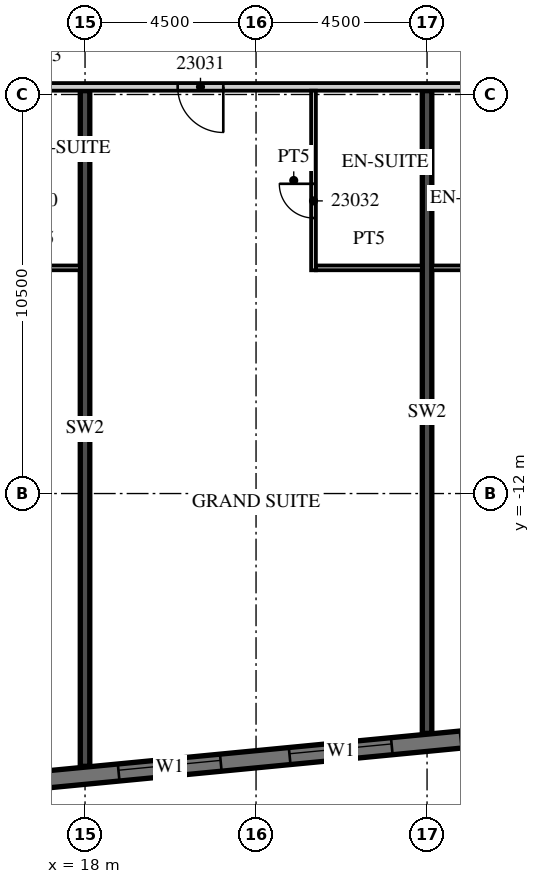
"""IFC4 building model, lengths in metres.
Left out: names, types, materials, properties, quantities, classifications, styles, units other than length and angle.
Written with IfcOpenShell. Run it as: python <this file> out.ifc"""

import sys

from ifc_helpers import new_model, si_unit, direction, frame, frame_2d, origin, place, context, subcontext, project, spatial, rectangle, extrude, element, fill, save


model = new_model("IFC4")
c1 = context("Model", 3, precision=1e-05, world=origin(), true_north=direction((0.0, 1.0)))
c2 = subcontext(c1, "Body", "Model", "MODEL_VIEW")
j1 = project(units=[si_unit("LENGTHUNIT", "METRE"), si_unit("PLANEANGLEUNIT", "RADIAN")], contexts=[c1])
p1 = place(None, origin())
s1 = spatial("IfcSite", under=j1, at=p1, CompositionType="ELEMENT")
p2 = place(p1, origin())
s2 = spatial("IfcBuilding", under=s1, at=p2, CompositionType="ELEMENT")
p3 = place(p2, frame((0.0, 0.0, 110.8)))
s3 = spatial("IfcBuildingStorey", under=s2, at=p3, CompositionType="ELEMENT", Elevation=110.8)
p4 = place(p3, frame((18.0, -19.177, 0.0), z_axis=(0.0, 0.0, 1.0), x_axis=(0.0, 1.0, 0.0)))
e1 = element("IfcWall", 1, at=p4, inside=s3, PredefinedType="SHEAR", context=c2, shape_type="SweptSolid", body=[
    extrude(rectangle(XDim=17.777, YDim=0.25, at=frame_2d((8.889, 0.0))), origin(), (0.0, 0.0, 1.0), 3.3),
])
p5 = place(p3, frame((27.0, -18.311, 0.0), z_axis=(0.0, 0.0, 1.0), x_axis=(0.0, 1.0, 0.0)))
e2 = element("IfcWall", 2, at=p5, inside=s3, PredefinedType="SHEAR", context=c2, shape_type="SweptSolid", body=[
    extrude(rectangle(XDim=16.911, YDim=0.25, at=frame_2d((8.455, 0.0))), origin(), (0.0, 0.0, 1.0), 3.3),
])
p6 = place(p3, frame((-13.521, -22.46, 0.0), z_axis=(0.0, 0.0, 1.0), x_axis=(0.995396096335, 0.095846812164, 0.0)))
e3 = element("IfcWall", 3, at=p6, inside=s3, PredefinedType="SOLIDWALL", context=c2, shape_type="SweptSolid", body=[
    extrude(rectangle(XDim=59.151, YDim=0.45, at=frame_2d((29.575, 0.0))), origin(), (0.0, 0.0, 1.0), 3.02),
])
p7 = place(p6, frame((0.91, 0.0, 0.45)))
e4 = element("IfcOpeningElement", 4, at=p7, cuts=e3, PredefinedType="OPENING", context=c2, shape_type="SweptSolid", body=[
    extrude(rectangle(XDim=2.7, YDim=2.25, at=frame_2d((1.35, 1.125))), frame((0.0, 0.235, 0.0), z_axis=(0.0, -1.0, 0.0), x_axis=(1.0, 0.0, 0.0)), (0.0, 0.0, 1.0), 0.47),
])
p8 = place(p6, frame((5.431, 0.0, 0.45)))
e5 = element("IfcOpeningElement", 5, at=p8, cuts=e3, PredefinedType="OPENING", context=c2, shape_type="SweptSolid", body=[
    extrude(rectangle(XDim=2.7, YDim=2.25, at=frame_2d((1.35, 1.125))), frame((0.0, 0.235, 0.0), z_axis=(0.0, -1.0, 0.0), x_axis=(1.0, 0.0, 0.0)), (0.0, 0.0, 1.0), 0.47),
])
p9 = place(p6, frame((9.952, 0.0, 0.45)))
e6 = element("IfcOpeningElement", 6, at=p9, cuts=e3, PredefinedType="OPENING", context=c2, shape_type="SweptSolid", body=[
    extrude(rectangle(XDim=2.7, YDim=2.25, at=frame_2d((1.35, 1.125))), frame((0.0, 0.235, 0.0), z_axis=(0.0, -1.0, 0.0), x_axis=(1.0, 0.0, 0.0)), (0.0, 0.0, 1.0), 0.47),
])
p10 = place(p6, frame((14.473, 0.0, 0.45)))
e7 = element("IfcOpeningElement", 7, at=p10, cuts=e3, PredefinedType="OPENING", context=c2, shape_type="SweptSolid", body=[
    extrude(rectangle(XDim=2.7, YDim=2.25, at=frame_2d((1.35, 1.125))), frame((0.0, 0.235, 0.0), z_axis=(0.0, -1.0, 0.0), x_axis=(1.0, 0.0, 0.0)), (0.0, 0.0, 1.0), 0.47),
])
p11 = place(p6, frame((18.994, 0.0, 0.45)))
e8 = element("IfcOpeningElement", 8, at=p11, cuts=e3, PredefinedType="OPENING", context=c2, shape_type="SweptSolid", body=[
    extrude(rectangle(XDim=2.7, YDim=2.25, at=frame_2d((1.35, 1.125))), frame((0.0, 0.235, 0.0), z_axis=(0.0, -1.0, 0.0), x_axis=(1.0, 0.0, 0.0)), (0.0, 0.0, 1.0), 0.47),
])
p12 = place(p6, frame((23.514, 0.0, 0.45)))
e9 = element("IfcOpeningElement", 9, at=p12, cuts=e3, PredefinedType="OPENING", context=c2, shape_type="SweptSolid", body=[
    extrude(rectangle(XDim=2.7, YDim=2.25, at=frame_2d((1.35, 1.125))), frame((0.0, 0.235, 0.0), z_axis=(0.0, -1.0, 0.0), x_axis=(1.0, 0.0, 0.0)), (0.0, 0.0, 1.0), 0.47),
])
p13 = place(p6, frame((28.035, 0.0, 0.45)))
e10 = element("IfcOpeningElement", 10, at=p13, cuts=e3, PredefinedType="OPENING", context=c2, shape_type="SweptSolid", body=[
    extrude(rectangle(XDim=2.7, YDim=2.25, at=frame_2d((1.35, 1.125))), frame((0.0, 0.235, 0.0), z_axis=(0.0, -1.0, 0.0), x_axis=(1.0, 0.0, 0.0)), (0.0, 0.0, 1.0), 0.47),
])
p14 = place(p6, frame((32.556, 0.0, 0.45)))
e11 = element("IfcOpeningElement", 11, at=p14, cuts=e3, PredefinedType="OPENING", context=c2, shape_type="SweptSolid", body=[
    extrude(rectangle(XDim=2.7, YDim=2.25, at=frame_2d((1.35, 1.125))), frame((0.0, 0.235, 0.0), z_axis=(0.0, -1.0, 0.0), x_axis=(1.0, 0.0, 0.0)), (0.0, 0.0, 1.0), 0.47),
])
p15 = place(p6, frame((37.077, 0.0, 0.45)))
e12 = element("IfcOpeningElement", 12, at=p15, cuts=e3, PredefinedType="OPENING", context=c2, shape_type="SweptSolid", body=[
    extrude(rectangle(XDim=2.7, YDim=2.25, at=frame_2d((1.35, 1.125))), frame((0.0, 0.235, 0.0), z_axis=(0.0, -1.0, 0.0), x_axis=(1.0, 0.0, 0.0)), (0.0, 0.0, 1.0), 0.47),
])
p16 = place(p6, frame((41.598, 0.0, 0.45)))
e13 = element("IfcOpeningElement", 13, at=p16, cuts=e3, PredefinedType="OPENING", context=c2, shape_type="SweptSolid", body=[
    extrude(rectangle(XDim=2.7, YDim=2.25, at=frame_2d((1.35, 1.125))), frame((0.0, 0.235, 0.0), z_axis=(0.0, -1.0, 0.0), x_axis=(1.0, 0.0, 0.0)), (0.0, 0.0, 1.0), 0.47),
])
p17 = place(p6, frame((46.118, 0.0, 0.45)))
e14 = element("IfcOpeningElement", 14, at=p17, cuts=e3, PredefinedType="OPENING", context=c2, shape_type="SweptSolid", body=[
    extrude(rectangle(XDim=2.7, YDim=2.25, at=frame_2d((1.35, 1.125))), frame((0.0, 0.235, 0.0), z_axis=(0.0, -1.0, 0.0), x_axis=(1.0, 0.0, 0.0)), (0.0, 0.0, 1.0), 0.47),
])
p18 = place(p6, frame((50.639, 0.0, 0.45)))
e15 = element("IfcOpeningElement", 15, at=p18, cuts=e3, PredefinedType="OPENING", context=c2, shape_type="SweptSolid", body=[
    extrude(rectangle(XDim=2.7, YDim=2.25, at=frame_2d((1.35, 1.125))), frame((0.0, 0.235, 0.0), z_axis=(0.0, -1.0, 0.0), x_axis=(1.0, 0.0, 0.0)), (0.0, 0.0, 1.0), 0.47),
])
p19 = place(p6, frame((55.15, 0.0, 0.45)))
e16 = element("IfcOpeningElement", 16, at=p19, cuts=e3, PredefinedType="OPENING", context=c2, shape_type="SweptSolid", body=[
    extrude(rectangle(XDim=2.7, YDim=2.25, at=frame_2d((1.35, 1.125))), frame((0.0, 0.235, 0.0), z_axis=(0.0, -1.0, 0.0), x_axis=(1.0, 0.0, 0.0)), (0.0, 0.0, 1.0), 0.47),
])
p20 = place(p3, frame((-13.5, -1.3, 0.0), z_axis=(0.0, 0.0, 1.0), x_axis=(1.0, 0.0, 0.0)))
e17 = element("IfcWall", 17, at=p20, inside=s3, PredefinedType="PARTITIONING", context=c2, shape_type="SweptSolid", body=[
    extrude(rectangle(XDim=60.932, YDim=0.2, at=frame_2d((30.466, 0.0))), origin(), (0.0, 0.0, 1.0), 3.02),
])
p21 = place(p20, frame((0.575, 0.0, 0.0)))
e18 = element("IfcOpeningElement", 18, at=p21, cuts=e17, PredefinedType="OPENING", context=c2, shape_type="SweptSolid", body=[
    extrude(rectangle(XDim=1.0, YDim=2.1, at=frame_2d((0.5, 1.05))), frame((0.0, 0.11, 0.0), z_axis=(0.0, -1.0, 0.0), x_axis=(1.0, 0.0, 0.0)), (0.0, 0.0, 1.0), 0.22),
])
p22 = place(p20, frame((5.075, 0.0, 0.0)))
e19 = element("IfcOpeningElement", 19, at=p22, cuts=e17, PredefinedType="OPENING", context=c2, shape_type="SweptSolid", body=[
    extrude(rectangle(XDim=1.0, YDim=2.1, at=frame_2d((0.5, 1.05))), frame((0.0, 0.11, 0.0), z_axis=(0.0, -1.0, 0.0), x_axis=(1.0, 0.0, 0.0)), (0.0, 0.0, 1.0), 0.22),
])
p23 = place(p20, frame((11.925, 0.0, 0.0)))
e20 = element("IfcOpeningElement", 20, at=p23, cuts=e17, PredefinedType="OPENING", context=c2, shape_type="SweptSolid", body=[
    extrude(rectangle(XDim=1.0, YDim=2.1, at=frame_2d((0.5, 1.05))), frame((0.0, 0.11, 0.0), z_axis=(0.0, -1.0, 0.0), x_axis=(1.0, 0.0, 0.0)), (0.0, 0.0, 1.0), 0.22),
])
p24 = place(p20, frame((15.938, 0.0, 0.0)))
e21 = element("IfcOpeningElement", 21, at=p24, cuts=e17, PredefinedType="OPENING", context=c2, shape_type="SweptSolid", body=[
    extrude(rectangle(XDim=1.2, YDim=2.1, at=frame_2d((0.6, 1.05))), frame((0.0, 0.11, 0.0), z_axis=(0.0, -1.0, 0.0), x_axis=(1.0, 0.0, 0.0)), (0.0, 0.0, 1.0), 0.22),
])
p25 = place(p20, frame((25.45, 0.0, 0.0)))
e22 = element("IfcOpeningElement", 22, at=p25, cuts=e17, PredefinedType="OPENING", context=c2, shape_type="SweptSolid", body=[
    extrude(rectangle(XDim=1.0, YDim=2.1, at=frame_2d((0.5, 1.05))), frame((0.0, 0.11, 0.0), z_axis=(0.0, -1.0, 0.0), x_axis=(1.0, 0.0, 0.0)), (0.0, 0.0, 1.0), 0.22),
])
p26 = place(p20, frame((27.55, 0.0, 0.0)))
e23 = element("IfcOpeningElement", 23, at=p26, cuts=e17, PredefinedType="OPENING", context=c2, shape_type="SweptSolid", body=[
    extrude(rectangle(XDim=1.0, YDim=2.1, at=frame_2d((0.5, 1.05))), frame((0.0, 0.11, 0.0), z_axis=(0.0, -1.0, 0.0), x_axis=(1.0, 0.0, 0.0)), (0.0, 0.0, 1.0), 0.22),
])
p27 = place(p20, frame((33.938, 0.0, 0.0)))
e24 = element("IfcOpeningElement", 24, at=p27, cuts=e17, PredefinedType="OPENING", context=c2, shape_type="SweptSolid", body=[
    extrude(rectangle(XDim=1.2, YDim=2.1, at=frame_2d((0.6, 1.05))), frame((0.0, 0.11, 0.0), z_axis=(0.0, -1.0, 0.0), x_axis=(1.0, 0.0, 0.0)), (0.0, 0.0, 1.0), 0.22),
])
p28 = place(p20, frame((45.862, 0.0, 0.0)))
e25 = element("IfcOpeningElement", 25, at=p28, cuts=e17, PredefinedType="OPENING", context=c2, shape_type="SweptSolid", body=[
    extrude(rectangle(XDim=1.2, YDim=2.1, at=frame_2d((0.6, 1.05))), frame((0.0, 0.11, 0.0), z_axis=(0.0, -1.0, 0.0), x_axis=(1.0, 0.0, 0.0)), (0.0, 0.0, 1.0), 0.22),
])
p29 = place(p20, frame((52.425, 0.0, 0.0)))
e26 = element("IfcOpeningElement", 26, at=p29, cuts=e17, PredefinedType="OPENING", context=c2, shape_type="SweptSolid", body=[
    extrude(rectangle(XDim=1.0, YDim=2.1, at=frame_2d((0.5, 1.05))), frame((0.0, 0.11, 0.0), z_axis=(0.0, -1.0, 0.0), x_axis=(1.0, 0.0, 0.0)), (0.0, 0.0, 1.0), 0.22),
])
p30 = place(p20, frame((56.95, 0.0, 0.0)))
e27 = element("IfcOpeningElement", 27, at=p30, cuts=e17, PredefinedType="OPENING", context=c2, shape_type="SweptSolid", body=[
    extrude(rectangle(XDim=1.0, YDim=2.1, at=frame_2d((0.5, 1.05))), frame((0.0, 0.11, 0.0), z_axis=(0.0, -1.0, 0.0), x_axis=(1.0, 0.0, 0.0)), (0.0, 0.0, 1.0), 0.22),
])
p31 = place(p20, frame((59.882, 0.0, 0.0)))
e28 = element("IfcOpeningElement", 28, at=p31, cuts=e17, PredefinedType="OPENING", context=c2, shape_type="SweptSolid", body=[
    extrude(rectangle(XDim=0.9, YDim=2.1, at=frame_2d((0.45, 1.05))), frame((0.0, 0.11, 0.0), z_axis=(0.0, -1.0, 0.0), x_axis=(1.0, 0.0, 0.0)), (0.0, 0.0, 1.0), 0.22),
])
p32 = place(p3, frame((15.625, -6.062, 0.0), z_axis=(0.0, 0.0, 1.0), x_axis=(1.0, 0.0, 0.0)))
e29 = element("IfcWall", 29, at=p32, inside=s3, PredefinedType="PARTITIONING", context=c2, shape_type="SweptSolid", body=[
    extrude(rectangle(XDim=2.25, YDim=0.125, at=frame_2d((1.125, 0.0))), origin(), (0.0, 0.0, 1.0), 3.02),
])
p33 = place(p3, frame((24.012, -6.125, 0.0), z_axis=(0.0, 0.0, 1.0), x_axis=(0.0, 1.0, 0.0)))
e30 = element("IfcWall", 30, at=p33, inside=s3, PredefinedType="PARTITIONING", context=c2, shape_type="SweptSolid", body=[
    extrude(rectangle(XDim=4.725, YDim=0.125, at=frame_2d((2.363, 0.0))), origin(), (0.0, 0.0, 1.0), 3.02),
])
p34 = place(p33, frame((1.375, 0.0, 0.0)))
e31 = element("IfcOpeningElement", 31, at=p34, cuts=e30, PredefinedType="OPENING", context=c2, shape_type="SweptSolid", body=[
    extrude(rectangle(XDim=0.9, YDim=2.1, at=frame_2d((0.45, 1.05))), frame((0.0, 0.073, 0.0), z_axis=(0.0, -1.0, 0.0), x_axis=(1.0, 0.0, 0.0)), (0.0, 0.0, 1.0), 0.145),
])
for number, where, z_axis, x_axis in (
    (32, (24.075, -6.062, 0.0), (0.0, 0.0, 1.0), (1.0, 0.0, 0.0)),
    (33, (27.125, -6.062, 0.0), (0.0, 0.0, 1.0), (1.0, 0.0, 0.0)),
):
    element("IfcWall", number, at=place(p3, frame(where, z_axis=z_axis, x_axis=x_axis)), inside=s3, PredefinedType="PARTITIONING", context=c2, shape_type="SweptSolid", body=[
        extrude(rectangle(XDim=2.8, YDim=0.125, at=frame_2d((1.4, 0.0))), origin(), (0.0, 0.0, 1.0), 3.02),
    ])
p35 = place(p14, origin())
e34 = element("IfcWindow", 34, at=p35, inside=s3, PartitioningType="SINGLE_PANEL", PredefinedType="WINDOW", context=c2, shape_type="SweptSolid", body=[
    extrude(rectangle(XDim=2.7, YDim=2.25, at=frame_2d((1.35, 1.125))), frame((0.0, 0.09, 0.0), z_axis=(0.0, -1.0, 0.0), x_axis=(1.0, 0.0, 0.0)), (0.0, 0.0, 1.0), 0.06),
])
fill(e11, e34)
p36 = place(p15, origin())
e35 = element("IfcWindow", 35, at=p36, inside=s3, PartitioningType="SINGLE_PANEL", PredefinedType="WINDOW", context=c2, shape_type="SweptSolid", body=[
    extrude(rectangle(XDim=2.7, YDim=2.25, at=frame_2d((1.35, 1.125))), frame((0.0, 0.09, 0.0), z_axis=(0.0, -1.0, 0.0), x_axis=(1.0, 0.0, 0.0)), (0.0, 0.0, 1.0), 0.06),
])
fill(e12, e35)
p37 = place(p27, origin())
e36 = element("IfcDoor", 36, at=p37, inside=s3, OperationType="SINGLE_SWING_RIGHT", PredefinedType="DOOR", context=c2, shape_type="SweptSolid", body=[
    extrude(rectangle(XDim=1.2, YDim=2.1, at=frame_2d((0.6, 1.05))), frame((0.0, 0.025, 0.0), z_axis=(0.0, -1.0, 0.0), x_axis=(1.0, 0.0, 0.0)), (0.0, 0.0, 1.0), 0.05),
])
fill(e24, e36)
p38 = place(p34, origin())
e37 = element("IfcDoor", 37, at=p38, inside=s3, OperationType="SINGLE_SWING_RIGHT", PredefinedType="DOOR", context=c2, shape_type="SweptSolid", body=[
    extrude(rectangle(XDim=0.9, YDim=2.1, at=frame_2d((0.45, 1.05))), frame((0.0, 0.025, 0.0), z_axis=(0.0, -1.0, 0.0), x_axis=(1.0, 0.0, 0.0)), (0.0, 0.0, 1.0), 0.05),
])
fill(e31, e37)
save(model, sys.argv[1])
